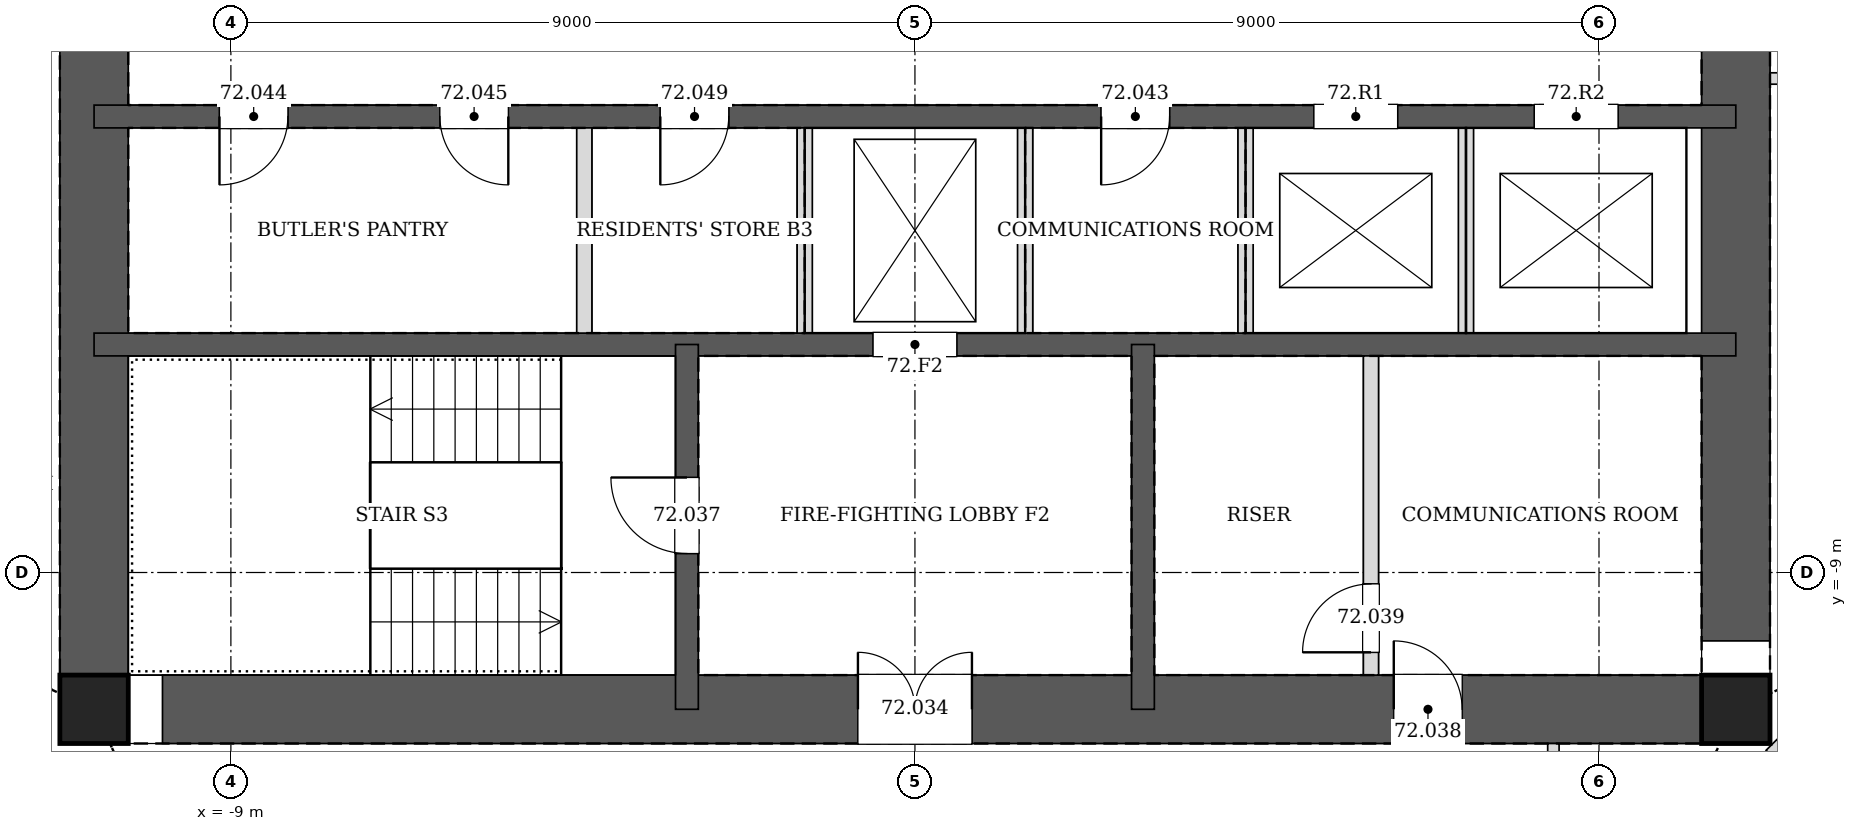
"""IFC4 building model, lengths in metres.
Left out: names, types, materials, properties, quantities, classifications, styles, units other than length and angle.
Written with IfcOpenShell. Run it as: python <this file> out.ifc"""

import sys

from ifc_helpers import new_model, si_unit, direction, frame, frame_2d, origin, origin_2d, place, context, subcontext, project, spatial, rectangle, hollow_rectangle, extrude, element, fill, save


model = new_model("IFC4")
c1 = context("Model", 3, precision=1e-05, world=origin(), true_north=direction((0.0, 1.0)))
c2 = subcontext(c1, "Body", "Model", "MODEL_VIEW")
j1 = project(units=[si_unit("LENGTHUNIT", "METRE"), si_unit("PLANEANGLEUNIT", "RADIAN")], contexts=[c1])
p1 = place(None, origin())
s1 = spatial("IfcSite", under=j1, at=p1, CompositionType="ELEMENT")
p2 = place(p1, origin())
s2 = spatial("IfcBuilding", under=s1, at=p2, CompositionType="ELEMENT")
p3 = place(p2, frame((0.0, 0.0, 294.6)))
s3 = spatial("IfcBuildingStorey", under=s2, at=p3, CompositionType="ELEMENT", Elevation=294.6)
for number, where, z_axis, x_axis in (
    (1, (-10.8, -10.8, 0.0), (0.0, 0.0, 1.0), (1.0, 0.0, 0.0)),
    (2, (10.8, -10.8, 0.0), (0.0, 0.0, 1.0), (1.0, 0.0, 0.0)),
):
    element("IfcColumn", number, at=place(p3, frame(where, z_axis=z_axis, x_axis=x_axis)), inside=s3, PredefinedType="COLUMN", context=c2, shape_type="SweptSolid", body=[
        extrude(hollow_rectangle(XDim=0.9, YDim=0.9, WallThickness=0.04, at=origin_2d()), origin(), (0.0, 0.0, 1.0), 3.4),
    ])
p4 = place(p3, frame((-10.8, -10.8, 0.0), z_axis=(0.0, 0.0, 1.0), x_axis=(1.0, 0.0, 0.0)))
e3 = element("IfcWall", 3, at=p4, inside=s3, PredefinedType="SOLIDWALL", context=c2, shape_type="SweptSolid", body=[
    extrude(rectangle(XDim=21.6, YDim=0.9, at=frame_2d((10.8, 0.0))), origin(), (0.0, 0.0, 1.0), 3.4),
])
p5 = place(p4, frame((10.05, 0.0, 0.0)))
e4 = element("IfcOpeningElement", 4, at=p5, cuts=e3, PredefinedType="OPENING", context=c2, shape_type="SweptSolid", body=[
    extrude(rectangle(XDim=1.5, YDim=2.1, at=frame_2d((0.75, 1.05))), frame((0.0, 0.46, 0.0), z_axis=(0.0, -1.0, 0.0), x_axis=(1.0, 0.0, 0.0)), (0.0, 0.0, 1.0), 0.92),
])
p6 = place(p4, frame((17.1, 0.0, 0.0)))
e5 = element("IfcOpeningElement", 5, at=p6, cuts=e3, PredefinedType="OPENING", context=c2, shape_type="SweptSolid", body=[
    extrude(rectangle(XDim=0.9, YDim=2.1, at=frame_2d((0.45, 1.05))), frame((0.0, 0.46, 0.0), z_axis=(0.0, -1.0, 0.0), x_axis=(1.0, 0.0, 0.0)), (0.0, 0.0, 1.0), 0.92),
])
p7 = place(p3, frame((10.8, -10.8, 0.0), z_axis=(0.0, 0.0, 1.0), x_axis=(0.0, 1.0, 0.0)))
e6 = element("IfcWall", 6, at=p7, inside=s3, PredefinedType="SOLIDWALL", context=c2, shape_type="SweptSolid", body=[
    extrude(rectangle(XDim=21.6, YDim=0.9, at=frame_2d((10.8, 0.0))), origin(), (0.0, 0.0, 1.0), 3.4),
])
p8 = place(p7, frame((11.7, 0.0, 0.0)))
e7 = element("IfcOpeningElement", 7, at=p8, cuts=e6, PredefinedType="OPENING", context=c2, shape_type="SweptSolid", body=[
    extrude(rectangle(XDim=1.2, YDim=2.1, at=frame_2d((0.6, 1.05))), frame((0.0, 0.46, 0.0), z_axis=(0.0, -1.0, 0.0), x_axis=(1.0, 0.0, 0.0)), (0.0, 0.0, 1.0), 0.92),
])
p9 = place(p7, frame((8.7, 0.0, 0.0)))
e8 = element("IfcOpeningElement", 8, at=p9, cuts=e6, PredefinedType="OPENING", context=c2, shape_type="SweptSolid", body=[
    extrude(rectangle(XDim=1.2, YDim=2.1, at=frame_2d((0.6, 1.05))), frame((0.0, 0.46, 0.0), z_axis=(0.0, -1.0, 0.0), x_axis=(1.0, 0.0, 0.0)), (0.0, 0.0, 1.0), 0.92),
])
p10 = place(p3, frame((-10.8, 10.8, 0.0), z_axis=(0.0, 0.0, 1.0), x_axis=(0.0, -1.0, 0.0)))
e9 = element("IfcWall", 9, at=p10, inside=s3, PredefinedType="SOLIDWALL", context=c2, shape_type="SweptSolid", body=[
    extrude(rectangle(XDim=21.6, YDim=0.9, at=frame_2d((10.8, 0.0))), origin(), (0.0, 0.0, 1.0), 3.4),
])
p11 = place(p10, frame((8.7, 0.0, 0.0)))
e10 = element("IfcOpeningElement", 10, at=p11, cuts=e9, PredefinedType="OPENING", context=c2, shape_type="SweptSolid", body=[
    extrude(rectangle(XDim=1.2, YDim=2.1, at=frame_2d((0.6, 1.05))), frame((0.0, 0.46, 0.0), z_axis=(0.0, -1.0, 0.0), x_axis=(1.0, 0.0, 0.0)), (0.0, 0.0, 1.0), 0.92),
])
p12 = place(p10, frame((11.7, 0.0, 0.0)))
e11 = element("IfcOpeningElement", 11, at=p12, cuts=e9, PredefinedType="OPENING", context=c2, shape_type="SweptSolid", body=[
    extrude(rectangle(XDim=1.2, YDim=2.1, at=frame_2d((0.6, 1.05))), frame((0.0, 0.46, 0.0), z_axis=(0.0, -1.0, 0.0), x_axis=(1.0, 0.0, 0.0)), (0.0, 0.0, 1.0), 0.92),
])
p13 = place(p3, frame((-10.8, -3.0, 0.0), z_axis=(0.0, 0.0, 1.0), x_axis=(1.0, 0.0, 0.0)))
e12 = element("IfcWall", 12, at=p13, inside=s3, PredefinedType="SOLIDWALL", context=c2, shape_type="SweptSolid", body=[
    extrude(rectangle(XDim=21.6, YDim=0.3, at=frame_2d((10.8, 0.0))), origin(), (0.0, 0.0, 1.0), 3.4),
])
p14 = place(p13, frame((13.25, 0.0, 0.0)))
e13 = element("IfcOpeningElement", 13, at=p14, cuts=e12, PredefinedType="OPENING", context=c2, shape_type="SweptSolid", body=[
    extrude(rectangle(XDim=0.9, YDim=2.1, at=frame_2d((0.45, 1.05))), frame((0.0, 0.16, 0.0), z_axis=(0.0, -1.0, 0.0), x_axis=(1.0, 0.0, 0.0)), (0.0, 0.0, 1.0), 0.32),
])
p15 = place(p13, frame((1.65, 0.0, 0.0)))
e14 = element("IfcOpeningElement", 14, at=p15, cuts=e12, PredefinedType="OPENING", context=c2, shape_type="SweptSolid", body=[
    extrude(rectangle(XDim=0.9, YDim=2.1, at=frame_2d((0.45, 1.05))), frame((0.0, 0.16, 0.0), z_axis=(0.0, -1.0, 0.0), x_axis=(1.0, 0.0, 0.0)), (0.0, 0.0, 1.0), 0.32),
])
p16 = place(p13, frame((4.55, 0.0, 0.0)))
e15 = element("IfcOpeningElement", 15, at=p16, cuts=e12, PredefinedType="OPENING", context=c2, shape_type="SweptSolid", body=[
    extrude(rectangle(XDim=0.9, YDim=2.1, at=frame_2d((0.45, 1.05))), frame((0.0, 0.16, 0.0), z_axis=(0.0, -1.0, 0.0), x_axis=(1.0, 0.0, 0.0)), (0.0, 0.0, 1.0), 0.32),
])
p17 = place(p13, frame((7.45, 0.0, 0.0)))
e16 = element("IfcOpeningElement", 16, at=p17, cuts=e12, PredefinedType="OPENING", context=c2, shape_type="SweptSolid", body=[
    extrude(rectangle(XDim=0.9, YDim=2.1, at=frame_2d((0.45, 1.05))), frame((0.0, 0.16, 0.0), z_axis=(0.0, -1.0, 0.0), x_axis=(1.0, 0.0, 0.0)), (0.0, 0.0, 1.0), 0.32),
])
p18 = place(p13, frame((16.05, 0.0, 0.0)))
e17 = element("IfcOpeningElement", 17, at=p18, cuts=e12, PredefinedType="OPENING", context=c2, shape_type="SweptSolid", body=[
    extrude(rectangle(XDim=1.1, YDim=2.1, at=frame_2d((0.55, 1.05))), frame((0.0, 0.16, 0.0), z_axis=(0.0, -1.0, 0.0), x_axis=(1.0, 0.0, 0.0)), (0.0, 0.0, 1.0), 0.32),
])
p19 = place(p13, frame((18.95, 0.0, 0.0)))
e18 = element("IfcOpeningElement", 18, at=p19, cuts=e12, PredefinedType="OPENING", context=c2, shape_type="SweptSolid", body=[
    extrude(rectangle(XDim=1.1, YDim=2.1, at=frame_2d((0.55, 1.05))), frame((0.0, 0.16, 0.0), z_axis=(0.0, -1.0, 0.0), x_axis=(1.0, 0.0, 0.0)), (0.0, 0.0, 1.0), 0.32),
])
p20 = place(p3, frame((-10.8, -6.0, 0.0), z_axis=(0.0, 0.0, 1.0), x_axis=(1.0, 0.0, 0.0)))
e19 = element("IfcWall", 19, at=p20, inside=s3, PredefinedType="SOLIDWALL", context=c2, shape_type="SweptSolid", body=[
    extrude(rectangle(XDim=21.6, YDim=0.3, at=frame_2d((10.8, 0.0))), origin(), (0.0, 0.0, 1.0), 3.4),
])
p21 = place(p20, frame((10.25, 0.0, 0.0)))
e20 = element("IfcOpeningElement", 20, at=p21, cuts=e19, PredefinedType="OPENING", context=c2, shape_type="SweptSolid", body=[
    extrude(rectangle(XDim=1.1, YDim=2.1, at=frame_2d((0.55, 1.05))), frame((0.0, 0.16, 0.0), z_axis=(0.0, -1.0, 0.0), x_axis=(1.0, 0.0, 0.0)), (0.0, 0.0, 1.0), 0.32),
])
p22 = place(p3, frame((-3.0, -6.0, 0.0), z_axis=(0.0, 0.0, 1.0), x_axis=(0.0, -1.0, 0.0)))
e21 = element("IfcWall", 21, at=p22, inside=s3, PredefinedType="SOLIDWALL", context=c2, shape_type="SweptSolid", body=[
    extrude(rectangle(XDim=4.8, YDim=0.3, at=frame_2d((2.4, 0.0))), origin(), (0.0, 0.0, 1.0), 3.4),
])
p23 = place(p22, frame((1.75, 0.0, 0.0)))
e22 = element("IfcOpeningElement", 22, at=p23, cuts=e21, PredefinedType="OPENING", context=c2, shape_type="SweptSolid", body=[
    extrude(rectangle(XDim=1.0, YDim=2.1, at=frame_2d((0.5, 1.05))), frame((0.0, 0.16, 0.0), z_axis=(0.0, -1.0, 0.0), x_axis=(1.0, 0.0, 0.0)), (0.0, 0.0, 1.0), 0.32),
])
p24 = place(p3, frame((3.0, -6.0, 0.0), z_axis=(0.0, 0.0, 1.0), x_axis=(0.0, -1.0, 0.0)))
e23 = element("IfcWall", 23, at=p24, inside=s3, PredefinedType="SOLIDWALL", context=c2, shape_type="SweptSolid", body=[
    extrude(rectangle(XDim=4.8, YDim=0.3, at=frame_2d((2.4, 0.0))), origin(), (0.0, 0.0, 1.0), 3.4),
])
for number, where, z_axis, x_axis in (
    (24, (11.25, -2.5, 0.0), (0.0, 0.0, 1.0), (1.0, 0.0, 0.0)),
    (25, (8.4, -12.9, 0.0), (0.0, 0.0, 1.0), (0.0, 1.0, 0.0)),
):
    element("IfcWall", number, at=place(p3, frame(where, z_axis=z_axis, x_axis=x_axis)), inside=s3, PredefinedType="PARTITIONING", context=c2, shape_type="SweptSolid", body=[
        extrude(rectangle(XDim=1.65, YDim=0.15, at=frame_2d((0.825, 0.0))), origin(), (0.0, 0.0, 1.0), 3.2),
    ])
p25 = place(p3, frame((11.269, -11.269, 0.0), z_axis=(0.0, 0.0, 1.0), x_axis=(0.707106781187, -0.707106781187, 0.0)))
e26 = element("IfcWall", 26, at=p25, inside=s3, PredefinedType="PARTITIONING", context=c2, shape_type="SweptSolid", body=[
    extrude(rectangle(XDim=2.604, YDim=0.2, at=frame_2d((1.302, 0.0))), origin(), (0.0, 0.0, 1.0), 2.591),
])
for number, where, z_axis, x_axis in (
    (27, (-4.35, -5.85, 0.0), (0.0, 0.0, 1.0), (0.0, 1.0, 0.0)),
    (28, (-1.45, -5.85, 0.0), (0.0, 0.0, 1.0), (0.0, 1.0, 0.0)),
    (29, (1.45, -5.85, 0.0), (0.0, 0.0, 1.0), (0.0, 1.0, 0.0)),
    (30, (4.35, -5.85, 0.0), (0.0, 0.0, 1.0), (0.0, 1.0, 0.0)),
):
    element("IfcWall", number, at=place(p3, frame(where, z_axis=z_axis, x_axis=x_axis)), inside=s3, PredefinedType="PARTITIONING", context=c2, shape_type="SweptSolid", body=[
        extrude(rectangle(XDim=2.7, YDim=0.2, at=frame_2d((1.35, 0.0))), origin(), (0.0, 0.0, 1.0), 3.2),
    ])
p26 = place(p3, frame((7.25, -5.85, 0.0), z_axis=(0.0, 0.0, 1.0), x_axis=(0.0, 1.0, 0.0)))
e31 = element("IfcWall", 31, at=p26, inside=s3, PredefinedType="PARTITIONING", context=c2, shape_type="SweptSolid", body=[
    extrude(rectangle(XDim=2.7, YDim=0.2, at=frame_2d((1.35, 0.0))), origin(), (0.0, 0.0, 1.0), 3.4),
])
p27 = place(p3, frame((6.0, -10.35, 0.0), z_axis=(0.0, 0.0, 1.0), x_axis=(0.0, 1.0, 0.0)))
e32 = element("IfcWall", 32, at=p27, inside=s3, PredefinedType="PARTITIONING", context=c2, shape_type="SweptSolid", body=[
    extrude(rectangle(XDim=4.2, YDim=0.2, at=frame_2d((2.1, 0.0))), origin(), (0.0, 0.0, 1.0), 3.2),
])
p28 = place(p27, frame((0.3, 0.0, 0.0)))
e33 = element("IfcOpeningElement", 33, at=p28, cuts=e32, PredefinedType="OPENING", context=c2, shape_type="SweptSolid", body=[
    extrude(rectangle(XDim=0.9, YDim=2.1, at=frame_2d((0.45, 1.05))), frame((0.0, 0.11, 0.0), z_axis=(0.0, -1.0, 0.0), x_axis=(1.0, 0.0, 0.0)), (0.0, 0.0, 1.0), 0.22),
])
p29 = place(p5, origin())
e34 = element("IfcDoor", 34, at=p29, inside=s3, OperationType="DOUBLE_DOOR_SINGLE_SWING", PredefinedType="DOOR", context=c2, shape_type="SweptSolid", body=[
    extrude(rectangle(XDim=1.5, YDim=2.1, at=frame_2d((0.75, 1.05))), frame((0.0, 0.025, 0.0), z_axis=(0.0, -1.0, 0.0), x_axis=(1.0, 0.0, 0.0)), (0.0, 0.0, 1.0), 0.05),
])
fill(e4, e34)
p30 = place(p23, frame((1.0, 0.0, 0.0), z_axis=(0.0, 0.0, 1.0), x_axis=(-1.0, 0.0, 0.0)))
e35 = element("IfcDoor", 35, at=p30, inside=s3, OperationType="SINGLE_SWING_RIGHT", PredefinedType="DOOR", context=c2, shape_type="SweptSolid", body=[
    extrude(rectangle(XDim=1.0, YDim=2.1, at=frame_2d((0.5, 1.05))), frame((0.0, 0.025, 0.0), z_axis=(0.0, -1.0, 0.0), x_axis=(1.0, 0.0, 0.0)), (0.0, 0.0, 1.0), 0.05),
])
fill(e22, e35)
p31 = place(p6, origin())
e36 = element("IfcDoor", 36, at=p31, inside=s3, OperationType="SINGLE_SWING_LEFT", PredefinedType="DOOR", context=c2, shape_type="SweptSolid", body=[
    extrude(rectangle(XDim=0.9, YDim=2.1, at=frame_2d((0.45, 1.05))), frame((0.0, 0.025, 0.0), z_axis=(0.0, -1.0, 0.0), x_axis=(1.0, 0.0, 0.0)), (0.0, 0.0, 1.0), 0.05),
])
fill(e5, e36)
p32 = place(p28, origin())
e37 = element("IfcDoor", 37, at=p32, inside=s3, OperationType="SINGLE_SWING_LEFT", PredefinedType="DOOR", context=c2, shape_type="SweptSolid", body=[
    extrude(rectangle(XDim=0.9, YDim=2.1, at=frame_2d((0.45, 1.05))), frame((0.0, 0.025, 0.0), z_axis=(0.0, -1.0, 0.0), x_axis=(1.0, 0.0, 0.0)), (0.0, 0.0, 1.0), 0.05),
])
fill(e33, e37)
p33 = place(p14, frame((0.9, 0.0, 0.0), z_axis=(0.0, 0.0, 1.0), x_axis=(-1.0, 0.0, 0.0)))
e38 = element("IfcDoor", 38, at=p33, inside=s3, OperationType="SINGLE_SWING_RIGHT", PredefinedType="DOOR", context=c2, shape_type="SweptSolid", body=[
    extrude(rectangle(XDim=0.9, YDim=2.1, at=frame_2d((0.45, 1.05))), frame((0.0, 0.025, 0.0), z_axis=(0.0, -1.0, 0.0), x_axis=(1.0, 0.0, 0.0)), (0.0, 0.0, 1.0), 0.05),
])
fill(e13, e38)
p34 = place(p15, frame((0.9, 0.0, 0.0), z_axis=(0.0, 0.0, 1.0), x_axis=(-1.0, 0.0, 0.0)))
e39 = element("IfcDoor", 39, at=p34, inside=s3, OperationType="SINGLE_SWING_RIGHT", PredefinedType="DOOR", context=c2, shape_type="SweptSolid", body=[
    extrude(rectangle(XDim=0.9, YDim=2.1, at=frame_2d((0.45, 1.05))), frame((0.0, 0.025, 0.0), z_axis=(0.0, -1.0, 0.0), x_axis=(1.0, 0.0, 0.0)), (0.0, 0.0, 1.0), 0.05),
])
fill(e14, e39)
p35 = place(p16, frame((0.9, 0.0, 0.0), z_axis=(0.0, 0.0, 1.0), x_axis=(-1.0, 0.0, 0.0)))
e40 = element("IfcDoor", 40, at=p35, inside=s3, OperationType="SINGLE_SWING_LEFT", PredefinedType="DOOR", context=c2, shape_type="SweptSolid", body=[
    extrude(rectangle(XDim=0.9, YDim=2.1, at=frame_2d((0.45, 1.05))), frame((0.0, 0.025, 0.0), z_axis=(0.0, -1.0, 0.0), x_axis=(1.0, 0.0, 0.0)), (0.0, 0.0, 1.0), 0.05),
])
fill(e15, e40)
p36 = place(p17, frame((0.9, 0.0, 0.0), z_axis=(0.0, 0.0, 1.0), x_axis=(-1.0, 0.0, 0.0)))
e41 = element("IfcDoor", 41, at=p36, inside=s3, OperationType="SINGLE_SWING_RIGHT", PredefinedType="DOOR", context=c2, shape_type="SweptSolid", body=[
    extrude(rectangle(XDim=0.9, YDim=2.1, at=frame_2d((0.45, 1.05))), frame((0.0, 0.025, 0.0), z_axis=(0.0, -1.0, 0.0), x_axis=(1.0, 0.0, 0.0)), (0.0, 0.0, 1.0), 0.05),
])
fill(e16, e41)
p37 = place(p21, origin())
e42 = element("IfcDoor", 42, at=p37, inside=s3, OperationType="DOUBLE_DOOR_SLIDING", PredefinedType="DOOR", context=c2, shape_type="SweptSolid", body=[
    extrude(rectangle(XDim=1.1, YDim=2.1, at=frame_2d((0.55, 1.05))), frame((0.0, 0.025, 0.0), z_axis=(0.0, -1.0, 0.0), x_axis=(1.0, 0.0, 0.0)), (0.0, 0.0, 1.0), 0.05),
])
fill(e20, e42)
p38 = place(p18, origin())
e43 = element("IfcDoor", 43, at=p38, inside=s3, OperationType="DOUBLE_DOOR_SLIDING", PredefinedType="DOOR", context=c2, shape_type="SweptSolid", body=[
    extrude(rectangle(XDim=1.1, YDim=2.1, at=frame_2d((0.55, 1.05))), frame((0.0, 0.025, 0.0), z_axis=(0.0, -1.0, 0.0), x_axis=(1.0, 0.0, 0.0)), (0.0, 0.0, 1.0), 0.05),
])
fill(e17, e43)
p39 = place(p19, origin())
e44 = element("IfcDoor", 44, at=p39, inside=s3, OperationType="DOUBLE_DOOR_SLIDING", PredefinedType="DOOR", context=c2, shape_type="SweptSolid", body=[
    extrude(rectangle(XDim=1.1, YDim=2.1, at=frame_2d((0.55, 1.05))), frame((0.0, 0.025, 0.0), z_axis=(0.0, -1.0, 0.0), x_axis=(1.0, 0.0, 0.0)), (0.0, 0.0, 1.0), 0.05),
])
fill(e18, e44)
save(model, sys.argv[1])
